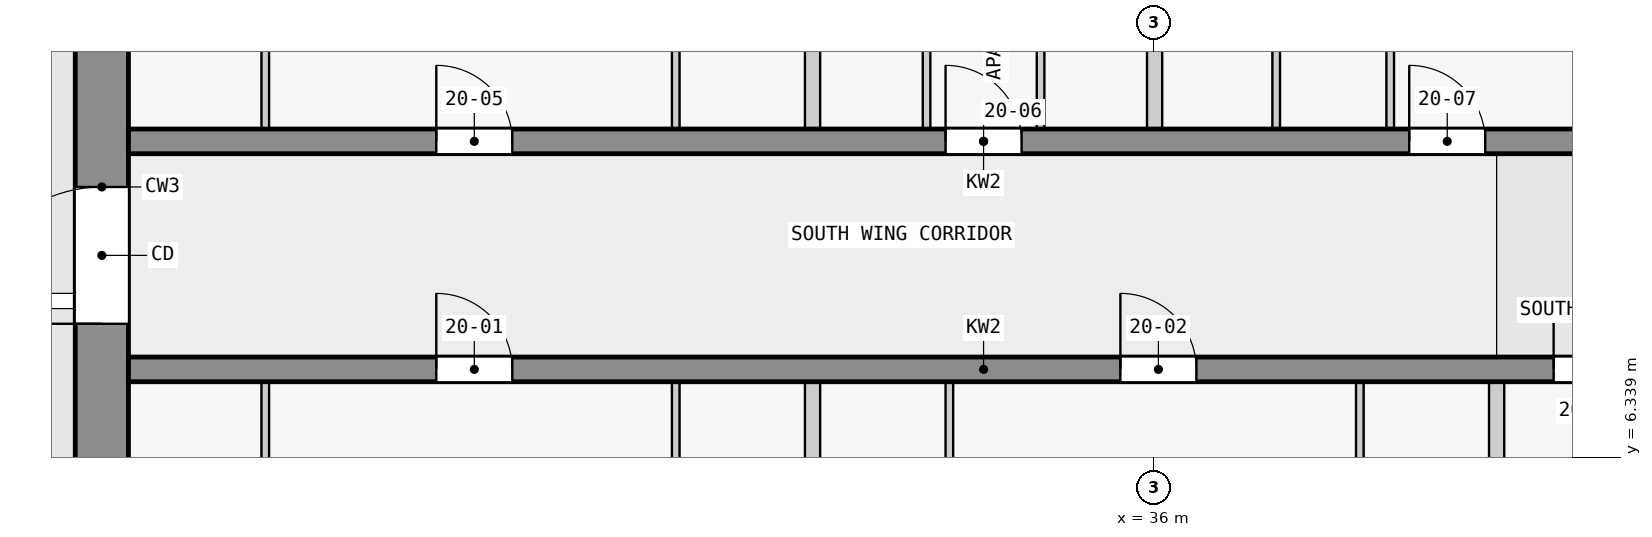
"""IFC4 building model, lengths in metres.
Left out: names, types, materials, properties, quantities, classifications, styles, units other than length and angle.
Written with IfcOpenShell. Run it as: python <this file> out.ifc"""

import sys

from ifc_helpers import new_model, si_unit, direction, frame, frame_2d, origin, place, context, subcontext, project, spatial, rectangle, extrude, element, fill, save


model = new_model("IFC4")
c1 = context("Model", 3, precision=1e-05, world=origin(), true_north=direction((0.0, 1.0)))
c2 = subcontext(c1, "Body", "Model", "MODEL_VIEW")
j1 = project(units=[si_unit("LENGTHUNIT", "METRE"), si_unit("PLANEANGLEUNIT", "RADIAN")], contexts=[c1])
p1 = place(None, origin())
s1 = spatial("IfcSite", under=j1, at=p1, CompositionType="ELEMENT")
p2 = place(p1, origin())
s2 = spatial("IfcBuilding", under=s1, at=p2, CompositionType="ELEMENT")
p3 = place(p2, frame((0.0, 0.0, 81.8)))
s3 = spatial("IfcBuildingStorey", under=s2, at=p3, CompositionType="ELEMENT", Elevation=81.8)
p4 = place(p3, frame((22.15, 2.5, 0.0), z_axis=(0.0, 0.0, 1.0), x_axis=(0.0, 1.0, 0.0)))
e1 = element("IfcWall", 1, at=p4, inside=s3, PredefinedType="SHEAR", context=c2, shape_type="SweptSolid", body=[
    extrude(rectangle(XDim=14.8, YDim=0.7, at=frame_2d((7.4, 0.0))), origin(), (0.0, 0.0, 1.0), 3.25),
])
p5 = place(p4, frame((5.6, 0.0, 0.0)))
e2 = element("IfcOpeningElement", 2, at=p5, cuts=e1, PredefinedType="OPENING", context=c2, shape_type="SweptSolid", body=[
    extrude(rectangle(XDim=1.8, YDim=2.1, at=frame_2d((0.9, 1.05))), frame((0.0, 0.36, 0.0), z_axis=(0.0, -1.0, 0.0), x_axis=(1.0, 0.0, 0.0)), (0.0, 0.0, 1.0), 0.72),
])
p6 = place(p3, frame((22.5, 7.5, 0.0), z_axis=(0.0, 0.0, 1.0), x_axis=(1.0, 0.0, 0.0)))
e3 = element("IfcWall", 3, at=p6, inside=s3, PredefinedType="SHEAR", context=c2, shape_type="SweptSolid", body=[
    extrude(rectangle(XDim=22.5, YDim=0.325, at=frame_2d((11.25, 0.0))), origin(), (0.0, 0.0, 1.0), 3.25),
])
p7 = place(p6, frame((4.05, 0.0, 0.0)))
e4 = element("IfcOpeningElement", 4, at=p7, cuts=e3, PredefinedType="OPENING", context=c2, shape_type="SweptSolid", body=[
    extrude(rectangle(XDim=1.0, YDim=2.1, at=frame_2d((0.5, 1.05))), frame((0.0, 0.172, 0.0), z_axis=(0.0, -1.0, 0.0), x_axis=(1.0, 0.0, 0.0)), (0.0, 0.0, 1.0), 0.345),
])
p8 = place(p6, frame((13.05, 0.0, 0.0)))
e5 = element("IfcOpeningElement", 5, at=p8, cuts=e3, PredefinedType="OPENING", context=c2, shape_type="SweptSolid", body=[
    extrude(rectangle(XDim=1.0, YDim=2.1, at=frame_2d((0.5, 1.05))), frame((0.0, 0.172, 0.0), z_axis=(0.0, -1.0, 0.0), x_axis=(1.0, 0.0, 0.0)), (0.0, 0.0, 1.0), 0.345),
])
p9 = place(p6, frame((18.75, 0.0, 0.0)))
e6 = element("IfcOpeningElement", 6, at=p9, cuts=e3, PredefinedType="OPENING", context=c2, shape_type="SweptSolid", body=[
    extrude(rectangle(XDim=0.9, YDim=2.1, at=frame_2d((0.45, 1.05))), frame((0.0, 0.172, 0.0), z_axis=(0.0, -1.0, 0.0), x_axis=(1.0, 0.0, 0.0)), (0.0, 0.0, 1.0), 0.345),
])
p10 = place(p6, frame((20.95, 0.0, 0.0)))
e7 = element("IfcOpeningElement", 7, at=p10, cuts=e3, PredefinedType="OPENING", context=c2, shape_type="SweptSolid", body=[
    extrude(rectangle(XDim=1.0, YDim=2.1, at=frame_2d((0.5, 1.05))), frame((0.0, 0.172, 0.0), z_axis=(0.0, -1.0, 0.0), x_axis=(1.0, 0.0, 0.0)), (0.0, 0.0, 1.0), 0.345),
])
p11 = place(p3, frame((22.5, 10.5, 0.0), z_axis=(0.0, 0.0, 1.0), x_axis=(1.0, 0.0, 0.0)))
e8 = element("IfcWall", 8, at=p11, inside=s3, PredefinedType="SHEAR", context=c2, shape_type="SweptSolid", body=[
    extrude(rectangle(XDim=22.5, YDim=0.325, at=frame_2d((11.25, 0.0))), origin(), (0.0, 0.0, 1.0), 3.25),
])
p12 = place(p11, frame((4.05, 0.0, 0.0)))
e9 = element("IfcOpeningElement", 9, at=p12, cuts=e8, PredefinedType="OPENING", context=c2, shape_type="SweptSolid", body=[
    extrude(rectangle(XDim=1.0, YDim=2.1, at=frame_2d((0.5, 1.05))), frame((0.0, 0.172, 0.0), z_axis=(0.0, -1.0, 0.0), x_axis=(1.0, 0.0, 0.0)), (0.0, 0.0, 1.0), 0.345),
])
p13 = place(p11, frame((10.75, 0.0, 0.0)))
e10 = element("IfcOpeningElement", 10, at=p13, cuts=e8, PredefinedType="OPENING", context=c2, shape_type="SweptSolid", body=[
    extrude(rectangle(XDim=1.0, YDim=2.1, at=frame_2d((0.5, 1.05))), frame((0.0, 0.172, 0.0), z_axis=(0.0, -1.0, 0.0), x_axis=(1.0, 0.0, 0.0)), (0.0, 0.0, 1.0), 0.345),
])
p14 = place(p11, frame((16.85, 0.0, 0.0)))
e11 = element("IfcOpeningElement", 11, at=p14, cuts=e8, PredefinedType="OPENING", context=c2, shape_type="SweptSolid", body=[
    extrude(rectangle(XDim=1.0, YDim=2.1, at=frame_2d((0.5, 1.05))), frame((0.0, 0.172, 0.0), z_axis=(0.0, -1.0, 0.0), x_axis=(1.0, 0.0, 0.0)), (0.0, 0.0, 1.0), 0.345),
])
p15 = place(p3, frame((24.3, 3.938, 0.0), z_axis=(0.0, 0.0, 1.0), x_axis=(0.0, 1.0, 0.0)))
e12 = element("IfcWall", 12, at=p15, inside=s3, PredefinedType="PARTITIONING", context=c2, shape_type="SweptSolid", body=[
    extrude(rectangle(XDim=3.4, YDim=0.1, at=frame_2d((1.7, 0.0))), origin(), (0.0, 0.0, 1.0), 3.25),
])
p16 = place(p15, frame((1.25, 0.0, 0.0)))
e13 = element("IfcOpeningElement", 13, at=p16, cuts=e12, PredefinedType="OPENING", context=c2, shape_type="SweptSolid", body=[
    extrude(rectangle(XDim=0.9, YDim=2.1, at=frame_2d((0.45, 1.05))), frame((0.0, 0.06, 0.0), z_axis=(0.0, -1.0, 0.0), x_axis=(1.0, 0.0, 0.0)), (0.0, 0.0, 1.0), 0.12),
])
p17 = place(p3, frame((24.3, 10.663, 0.0), z_axis=(0.0, 0.0, 1.0), x_axis=(0.0, 1.0, 0.0)))
e14 = element("IfcWall", 14, at=p17, inside=s3, PredefinedType="PARTITIONING", context=c2, shape_type="SweptSolid", body=[
    extrude(rectangle(XDim=3.4, YDim=0.1, at=frame_2d((1.7, 0.0))), origin(), (0.0, 0.0, 1.0), 3.25),
])
p18 = place(p17, frame((1.25, 0.0, 0.0)))
e15 = element("IfcOpeningElement", 15, at=p18, cuts=e14, PredefinedType="OPENING", context=c2, shape_type="SweptSolid", body=[
    extrude(rectangle(XDim=0.9, YDim=2.1, at=frame_2d((0.45, 1.05))), frame((0.0, 0.06, 0.0), z_axis=(0.0, -1.0, 0.0), x_axis=(1.0, 0.0, 0.0)), (0.0, 0.0, 1.0), 0.12),
])
p19 = place(p3, frame((29.7, 7.337, 0.0), z_axis=(0.0, 0.0, 1.0), x_axis=(0.0, -1.0, 0.0)))
e16 = element("IfcWall", 16, at=p19, inside=s3, PredefinedType="PARTITIONING", context=c2, shape_type="SweptSolid", body=[
    extrude(rectangle(XDim=3.35, YDim=0.1, at=frame_2d((1.675, 0.0))), origin(), (0.0, 0.0, 1.0), 3.25),
])
p20 = place(p19, frame((1.25, 0.0, 0.0)))
e17 = element("IfcOpeningElement", 17, at=p20, cuts=e16, PredefinedType="OPENING", context=c2, shape_type="SweptSolid", body=[
    extrude(rectangle(XDim=0.9, YDim=2.1, at=frame_2d((0.45, 1.05))), frame((0.0, 0.06, 0.0), z_axis=(0.0, -1.0, 0.0), x_axis=(1.0, 0.0, 0.0)), (0.0, 0.0, 1.0), 0.12),
])
p21 = place(p3, frame((29.7, 14.062, 0.0), z_axis=(0.0, 0.0, 1.0), x_axis=(0.0, -1.0, 0.0)))
e18 = element("IfcWall", 18, at=p21, inside=s3, PredefinedType="PARTITIONING", context=c2, shape_type="SweptSolid", body=[
    extrude(rectangle(XDim=3.4, YDim=0.1, at=frame_2d((1.7, 0.0))), origin(), (0.0, 0.0, 1.0), 3.25),
])
p22 = place(p21, frame((1.25, 0.0, 0.0)))
e19 = element("IfcOpeningElement", 19, at=p22, cuts=e18, PredefinedType="OPENING", context=c2, shape_type="SweptSolid", body=[
    extrude(rectangle(XDim=0.9, YDim=2.1, at=frame_2d((0.45, 1.05))), frame((0.0, 0.06, 0.0), z_axis=(0.0, -1.0, 0.0), x_axis=(1.0, 0.0, 0.0)), (0.0, 0.0, 1.0), 0.12),
])
for number, where, z_axis, x_axis in (
    (20, (31.5, 3.938, 0.0), (0.0, 0.0, 1.0), (0.0, 1.0, 0.0)),
    (21, (31.5, 10.663, 0.0), (0.0, 0.0, 1.0), (0.0, 1.0, 0.0)),
):
    element("IfcWall", number, at=place(p3, frame(where, z_axis=z_axis, x_axis=x_axis)), inside=s3, PredefinedType="PARTITIONING", context=c2, shape_type="SweptSolid", body=[
        extrude(rectangle(XDim=3.4, YDim=0.2, at=frame_2d((1.7, 0.0))), origin(), (0.0, 0.0, 1.0), 3.25),
    ])
p23 = place(p3, frame((33.0, 10.663, 0.0), z_axis=(0.0, 0.0, 1.0), x_axis=(0.0, 1.0, 0.0)))
e22 = element("IfcWall", 22, at=p23, inside=s3, PredefinedType="PARTITIONING", context=c2, shape_type="SweptSolid", body=[
    extrude(rectangle(XDim=3.4, YDim=0.1, at=frame_2d((1.7, 0.0))), origin(), (0.0, 0.0, 1.0), 3.25),
])
p24 = place(p23, frame((1.25, 0.0, 0.0)))
e23 = element("IfcOpeningElement", 23, at=p24, cuts=e22, PredefinedType="OPENING", context=c2, shape_type="SweptSolid", body=[
    extrude(rectangle(XDim=0.9, YDim=2.1, at=frame_2d((0.45, 1.05))), frame((0.0, 0.06, 0.0), z_axis=(0.0, -1.0, 0.0), x_axis=(1.0, 0.0, 0.0)), (0.0, 0.0, 1.0), 0.12),
])
p25 = place(p3, frame((33.3, 3.988, 0.0), z_axis=(0.0, 0.0, 1.0), x_axis=(0.0, 1.0, 0.0)))
e24 = element("IfcWall", 24, at=p25, inside=s3, PredefinedType="PARTITIONING", context=c2, shape_type="SweptSolid", body=[
    extrude(rectangle(XDim=3.35, YDim=0.1, at=frame_2d((1.675, 0.0))), origin(), (0.0, 0.0, 1.0), 3.25),
])
p26 = place(p25, frame((1.25, 0.0, 0.0)))
e25 = element("IfcOpeningElement", 25, at=p26, cuts=e24, PredefinedType="OPENING", context=c2, shape_type="SweptSolid", body=[
    extrude(rectangle(XDim=0.9, YDim=2.1, at=frame_2d((0.45, 1.05))), frame((0.0, 0.06, 0.0), z_axis=(0.0, -1.0, 0.0), x_axis=(1.0, 0.0, 0.0)), (0.0, 0.0, 1.0), 0.12),
])
p27 = place(p3, frame((34.5, 14.012, 0.0), z_axis=(0.0, 0.0, 1.0), x_axis=(0.0, -1.0, 0.0)))
e26 = element("IfcWall", 26, at=p27, inside=s3, PredefinedType="PARTITIONING", context=c2, shape_type="SweptSolid", body=[
    extrude(rectangle(XDim=3.35, YDim=0.1, at=frame_2d((1.675, 0.0))), origin(), (0.0, 0.0, 1.0), 3.25),
])
p28 = place(p27, frame((1.25, 0.0, 0.0)))
e27 = element("IfcOpeningElement", 27, at=p28, cuts=e26, PredefinedType="OPENING", context=c2, shape_type="SweptSolid", body=[
    extrude(rectangle(XDim=0.9, YDim=2.1, at=frame_2d((0.45, 1.05))), frame((0.0, 0.06, 0.0), z_axis=(0.0, -1.0, 0.0), x_axis=(1.0, 0.0, 0.0)), (0.0, 0.0, 1.0), 0.12),
])
p29 = place(p3, frame((36.0, 10.663, 0.0), z_axis=(0.0, 0.0, 1.0), x_axis=(0.0, 1.0, 0.0)))
e28 = element("IfcWall", 28, at=p29, inside=s3, PredefinedType="PARTITIONING", context=c2, shape_type="SweptSolid", body=[
    extrude(rectangle(XDim=3.4, YDim=0.2, at=frame_2d((1.7, 0.0))), origin(), (0.0, 0.0, 1.0), 3.25),
])
p30 = place(p3, frame((37.6, 10.663, 0.0), z_axis=(0.0, 0.0, 1.0), x_axis=(0.0, 1.0, 0.0)))
e29 = element("IfcWall", 29, at=p30, inside=s3, PredefinedType="PARTITIONING", context=c2, shape_type="SweptSolid", body=[
    extrude(rectangle(XDim=3.35, YDim=0.1, at=frame_2d((1.675, 0.0))), origin(), (0.0, 0.0, 1.0), 3.25),
])
p31 = place(p3, frame((38.7, 7.337, 0.0), z_axis=(0.0, 0.0, 1.0), x_axis=(0.0, -1.0, 0.0)))
e30 = element("IfcWall", 30, at=p31, inside=s3, PredefinedType="PARTITIONING", context=c2, shape_type="SweptSolid", body=[
    extrude(rectangle(XDim=3.4, YDim=0.1, at=frame_2d((1.7, 0.0))), origin(), (0.0, 0.0, 1.0), 3.25),
])
p32 = place(p31, frame((1.25, 0.0, 0.0)))
e31 = element("IfcOpeningElement", 31, at=p32, cuts=e30, PredefinedType="OPENING", context=c2, shape_type="SweptSolid", body=[
    extrude(rectangle(XDim=0.9, YDim=2.1, at=frame_2d((0.45, 1.05))), frame((0.0, 0.06, 0.0), z_axis=(0.0, -1.0, 0.0), x_axis=(1.0, 0.0, 0.0)), (0.0, 0.0, 1.0), 0.12),
])
p33 = place(p3, frame((39.1, 10.663, 0.0), z_axis=(0.0, 0.0, 1.0), x_axis=(0.0, 1.0, 0.0)))
e32 = element("IfcWall", 32, at=p33, inside=s3, PredefinedType="PARTITIONING", context=c2, shape_type="SweptSolid", body=[
    extrude(rectangle(XDim=3.35, YDim=0.1, at=frame_2d((1.675, 0.0))), origin(), (0.0, 0.0, 1.0), 3.25),
])
p34 = place(p33, frame((1.25, 0.0, 0.0)))
e33 = element("IfcOpeningElement", 33, at=p34, cuts=e32, PredefinedType="OPENING", context=c2, shape_type="SweptSolid", body=[
    extrude(rectangle(XDim=0.9, YDim=2.1, at=frame_2d((0.45, 1.05))), frame((0.0, 0.06, 0.0), z_axis=(0.0, -1.0, 0.0), x_axis=(1.0, 0.0, 0.0)), (0.0, 0.0, 1.0), 0.12),
])
p35 = place(p3, frame((40.5, 1.122, 0.0), z_axis=(0.0, 0.0, 1.0), x_axis=(0.0, 1.0, 0.0)))
e34 = element("IfcWall", 34, at=p35, inside=s3, PredefinedType="PARTITIONING", context=c2, shape_type="SweptSolid", body=[
    extrude(rectangle(XDim=6.215, YDim=0.2, at=frame_2d((3.107, 0.0))), origin(), (0.0, 0.0, 1.0), 3.25),
])
p36 = place(p5, origin())
e35 = element("IfcDoor", 35, at=p36, inside=s3, OperationType="DOUBLE_DOOR_SINGLE_SWING", PredefinedType="DOOR", context=c2, shape_type="SweptSolid", body=[
    extrude(rectangle(XDim=1.8, YDim=2.1, at=frame_2d((0.9, 1.05))), frame((0.0, 0.025, 0.0), z_axis=(0.0, -1.0, 0.0), x_axis=(1.0, 0.0, 0.0)), (0.0, 0.0, 1.0), 0.05),
])
fill(e2, e35)
p37 = place(p7, origin())
e36 = element("IfcDoor", 36, at=p37, inside=s3, OperationType="SINGLE_SWING_LEFT", PredefinedType="DOOR", context=c2, shape_type="SweptSolid", body=[
    extrude(rectangle(XDim=1.0, YDim=2.1, at=frame_2d((0.5, 1.05))), frame((0.0, 0.025, 0.0), z_axis=(0.0, -1.0, 0.0), x_axis=(1.0, 0.0, 0.0)), (0.0, 0.0, 1.0), 0.05),
])
fill(e4, e36)
p38 = place(p8, origin())
e37 = element("IfcDoor", 37, at=p38, inside=s3, OperationType="SINGLE_SWING_RIGHT", PredefinedType="DOOR", context=c2, shape_type="SweptSolid", body=[
    extrude(rectangle(XDim=1.0, YDim=2.1, at=frame_2d((0.5, 1.05))), frame((0.0, 0.025, 0.0), z_axis=(0.0, -1.0, 0.0), x_axis=(1.0, 0.0, 0.0)), (0.0, 0.0, 1.0), 0.05),
])
fill(e5, e37)
p39 = place(p9, origin())
e38 = element("IfcDoor", 38, at=p39, inside=s3, OperationType="SINGLE_SWING_RIGHT", PredefinedType="DOOR", context=c2, shape_type="SweptSolid", body=[
    extrude(rectangle(XDim=0.9, YDim=2.1, at=frame_2d((0.45, 1.05))), frame((0.0, 0.025, 0.0), z_axis=(0.0, -1.0, 0.0), x_axis=(1.0, 0.0, 0.0)), (0.0, 0.0, 1.0), 0.05),
])
fill(e6, e38)
p40 = place(p12, origin())
e39 = element("IfcDoor", 39, at=p40, inside=s3, OperationType="SINGLE_SWING_LEFT", PredefinedType="DOOR", context=c2, shape_type="SweptSolid", body=[
    extrude(rectangle(XDim=1.0, YDim=2.1, at=frame_2d((0.5, 1.05))), frame((0.0, 0.025, 0.0), z_axis=(0.0, -1.0, 0.0), x_axis=(1.0, 0.0, 0.0)), (0.0, 0.0, 1.0), 0.05),
])
fill(e9, e39)
p41 = place(p13, origin())
e40 = element("IfcDoor", 40, at=p41, inside=s3, OperationType="SINGLE_SWING_LEFT", PredefinedType="DOOR", context=c2, shape_type="SweptSolid", body=[
    extrude(rectangle(XDim=1.0, YDim=2.1, at=frame_2d((0.5, 1.05))), frame((0.0, 0.025, 0.0), z_axis=(0.0, -1.0, 0.0), x_axis=(1.0, 0.0, 0.0)), (0.0, 0.0, 1.0), 0.05),
])
fill(e10, e40)
p42 = place(p14, origin())
e41 = element("IfcDoor", 41, at=p42, inside=s3, OperationType="SINGLE_SWING_RIGHT", PredefinedType="DOOR", context=c2, shape_type="SweptSolid", body=[
    extrude(rectangle(XDim=1.0, YDim=2.1, at=frame_2d((0.5, 1.05))), frame((0.0, 0.025, 0.0), z_axis=(0.0, -1.0, 0.0), x_axis=(1.0, 0.0, 0.0)), (0.0, 0.0, 1.0), 0.05),
])
fill(e11, e41)
save(model, sys.argv[1])
